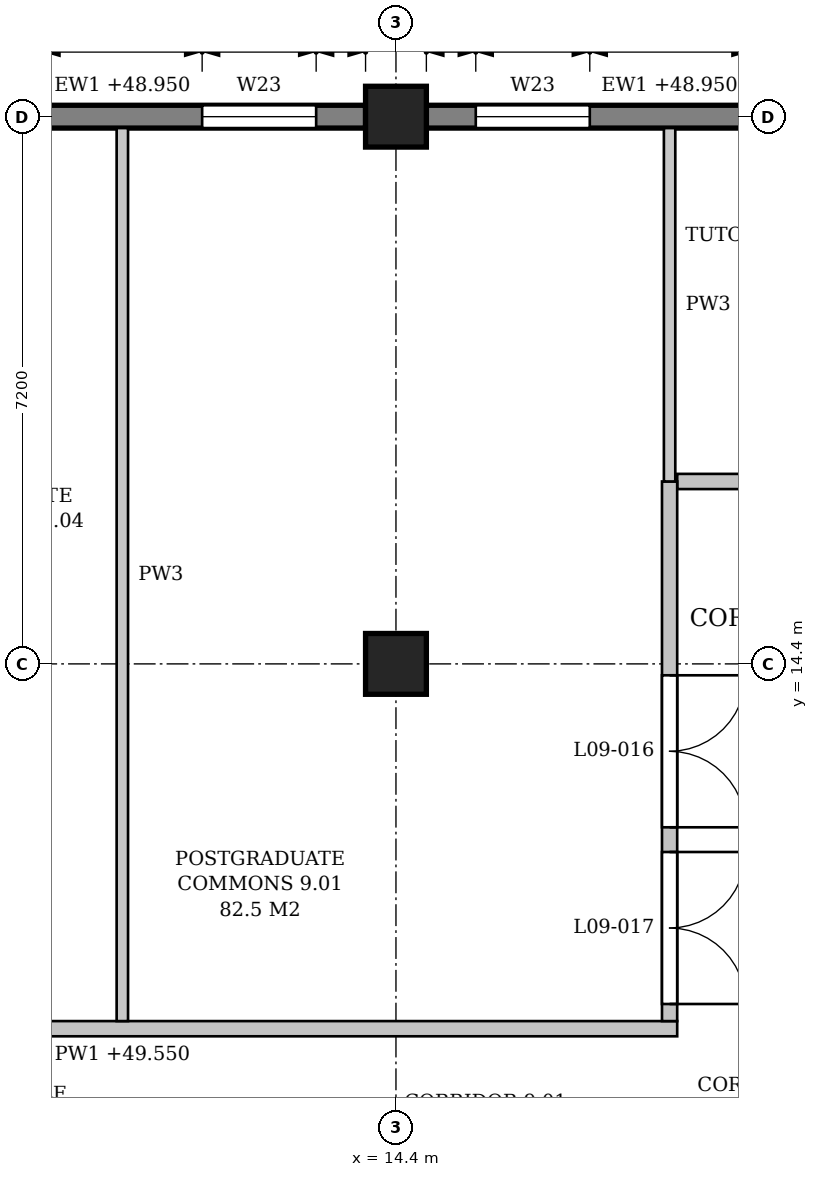
"""IFC4 building model, lengths in metres.
Left out: names, types, materials, properties, quantities, classifications, styles, units other than length and angle.
Written with IfcOpenShell. Run it as: python <this file> out.ifc"""

import sys

from ifc_helpers import new_model, si_unit, direction, frame, frame_2d, origin, origin_2d, place, context, subcontext, project, spatial, polyline, rectangle, outline, extrude, element, fill, save


model = new_model("IFC4")
c1 = context("Model", 3, precision=1e-05, world=origin(), true_north=direction((0.0, 1.0)))
c2 = subcontext(c1, "Body", "Model", "MODEL_VIEW")
j1 = project(units=[si_unit("LENGTHUNIT", "METRE"), si_unit("PLANEANGLEUNIT", "RADIAN")], contexts=[c1])
p1 = place(None, origin())
s1 = spatial("IfcSite", under=j1, at=p1, CompositionType="ELEMENT")
p2 = place(p1, origin())
s2 = spatial("IfcBuilding", under=s1, at=p2, CompositionType="ELEMENT")
p3 = place(p2, frame((0.0, 0.0, 45.3)))
s3 = spatial("IfcBuildingStorey", under=s2, at=p3, CompositionType="ELEMENT", Elevation=45.3)
for number, where, z_axis, x_axis in (
    (1, (14.4, 14.4, 0.0), (0.0, 0.0, 1.0), (1.0, 0.0, 0.0)),
    (2, (14.4, 21.6, 0.0), (0.0, 0.0, 1.0), (1.0, 0.0, 0.0)),
):
    element("IfcColumn", number, at=place(p3, frame(where, z_axis=z_axis, x_axis=x_axis)), inside=s3, PredefinedType="COLUMN", context=c2, shape_type="SweptSolid", body=[
        extrude(rectangle(XDim=0.8, YDim=0.8, at=origin_2d()), origin(), (0.0, 0.0, 1.0), 4.5),
    ])
p4 = place(p3, frame((21.2, 21.6, 0.0), z_axis=(0.0, 0.0, 1.0), x_axis=(-1.0, 0.0, 0.0)))
e3 = element("IfcWall", 3, at=p4, inside=s3, PredefinedType="STANDARD", context=c2, shape_type="SweptSolid", body=[
    extrude(rectangle(XDim=6.4, YDim=0.3, at=frame_2d((3.2, 0.0))), origin(), (0.0, 0.0, 1.0), 3.65),
])
p5 = place(p4, frame((0.65, 0.0, 0.9)))
e4 = element("IfcOpeningElement", 4, at=p5, cuts=e3, PredefinedType="OPENING", context=c2, shape_type="SweptSolid", body=[
    extrude(outline(polyline([(0.0, 0.0), (1.5, 0.0), (1.5, 1.95), (0.75, 2.7), (0.0, 1.95), (0.0, 0.0)])), frame((0.0, 0.16, 0.0), z_axis=(0.0, -1.0, 0.0), x_axis=(1.0, 0.0, 0.0)), (0.0, 0.0, 1.0), 0.32),
])
p6 = place(p4, frame((4.25, 0.0, 0.9)))
e5 = element("IfcOpeningElement", 5, at=p6, cuts=e3, PredefinedType="OPENING", context=c2, shape_type="SweptSolid", body=[
    extrude(outline(polyline([(0.0, 0.0), (1.5, 0.0), (1.5, 1.95), (0.75, 2.7), (0.0, 1.95), (0.0, 0.0)])), frame((0.0, 0.16, 0.0), z_axis=(0.0, -1.0, 0.0), x_axis=(1.0, 0.0, 0.0)), (0.0, 0.0, 1.0), 0.32),
])
p7 = place(p3, frame((14.0, 21.6, 0.0), z_axis=(0.0, 0.0, 1.0), x_axis=(-1.0, 0.0, 0.0)))
e6 = element("IfcWall", 6, at=p7, inside=s3, PredefinedType="STANDARD", context=c2, shape_type="SweptSolid", body=[
    extrude(rectangle(XDim=6.4, YDim=0.3, at=frame_2d((3.2, 0.0))), origin(), (0.0, 0.0, 1.0), 3.65),
])
p8 = place(p7, frame((0.65, 0.0, 0.9)))
e7 = element("IfcOpeningElement", 7, at=p8, cuts=e6, PredefinedType="OPENING", context=c2, shape_type="SweptSolid", body=[
    extrude(outline(polyline([(0.0, 0.0), (1.5, 0.0), (1.5, 1.95), (0.75, 2.7), (0.0, 1.95), (0.0, 0.0)])), frame((0.0, 0.16, 0.0), z_axis=(0.0, -1.0, 0.0), x_axis=(1.0, 0.0, 0.0)), (0.0, 0.0, 1.0), 0.32),
])
p9 = place(p7, frame((4.25, 0.0, 0.9)))
e8 = element("IfcOpeningElement", 8, at=p9, cuts=e6, PredefinedType="OPENING", context=c2, shape_type="SweptSolid", body=[
    extrude(outline(polyline([(0.0, 0.0), (1.5, 0.0), (1.5, 1.95), (0.75, 2.7), (0.0, 1.95), (0.0, 0.0)])), frame((0.0, 0.16, 0.0), z_axis=(0.0, -1.0, 0.0), x_axis=(1.0, 0.0, 0.0)), (0.0, 0.0, 1.0), 0.32),
])
p10 = place(p3, frame((3.5, 9.6, 0.0), z_axis=(0.0, 0.0, 1.0), x_axis=(1.0, 0.0, 0.0)))
e9 = element("IfcWall", 9, at=p10, inside=s3, PredefinedType="PARTITIONING", context=c2, shape_type="SweptSolid", body=[
    extrude(outline(polyline([(0.0, 0.0), (14.6, 0.0), (14.6, 4.25), (11.125, 4.25), (11.125, 3.55), (10.675, 3.55), (10.675, 4.25), (3.925, 4.25), (3.925, 3.55), (3.475, 3.55), (3.475, 4.25), (0.0, 4.25), (0.0, 0.0)])), frame((0.0, 0.1, 0.0), z_axis=(0.0, -1.0, 0.0), x_axis=(1.0, 0.0, 0.0)), (0.0, 0.0, 1.0), 0.2),
])
p11 = place(p10, frame((1.4, 0.0, 0.0)))
e10 = element("IfcOpeningElement", 10, at=p11, cuts=e9, PredefinedType="OPENING", context=c2, shape_type="SweptSolid", body=[
    extrude(rectangle(XDim=1.0, YDim=2.1, at=frame_2d((0.5, 1.05))), frame((0.0, 0.11, 0.0), z_axis=(0.0, -1.0, 0.0), x_axis=(1.0, 0.0, 0.0)), (0.0, 0.0, 1.0), 0.22),
])
p12 = place(p10, frame((5.0, 0.0, 0.0)))
e11 = element("IfcOpeningElement", 11, at=p12, cuts=e9, PredefinedType="OPENING", context=c2, shape_type="SweptSolid", body=[
    extrude(rectangle(XDim=1.0, YDim=2.1, at=frame_2d((0.5, 1.05))), frame((0.0, 0.11, 0.0), z_axis=(0.0, -1.0, 0.0), x_axis=(1.0, 0.0, 0.0)), (0.0, 0.0, 1.0), 0.22),
])
p13 = place(p3, frame((18.1, 16.8, 0.0), z_axis=(0.0, 0.0, 1.0), x_axis=(1.0, 0.0, 0.0)))
e12 = element("IfcWall", 12, at=p13, inside=s3, PredefinedType="PARTITIONING", context=c2, shape_type="SweptSolid", body=[
    extrude(outline(polyline([(0.0, 0.0), (3.4, 0.0), (3.4, 3.55), (3.275, 3.55), (3.275, 4.25), (0.0, 4.25), (0.0, 0.0)])), frame((0.0, 0.1, 0.0), z_axis=(0.0, -1.0, 0.0), x_axis=(1.0, 0.0, 0.0)), (0.0, 0.0, 1.0), 0.2),
])
p14 = place(p13, frame((1.2, 0.0, 0.0)))
e13 = element("IfcOpeningElement", 13, at=p14, cuts=e12, PredefinedType="OPENING", context=c2, shape_type="SweptSolid", body=[
    extrude(rectangle(XDim=1.0, YDim=2.1, at=frame_2d((0.5, 1.05))), frame((0.0, 0.11, 0.0), z_axis=(0.0, -1.0, 0.0), x_axis=(1.0, 0.0, 0.0)), (0.0, 0.0, 1.0), 0.22),
])
p15 = place(p3, frame((10.8, 9.7, 0.0), z_axis=(0.0, 0.0, 1.0), x_axis=(0.0, 1.0, 0.0)))
e14 = element("IfcWall", 14, at=p15, inside=s3, PredefinedType="PARTITIONING", context=c2, shape_type="SweptSolid", body=[
    extrude(rectangle(XDim=11.75, YDim=0.15, at=frame_2d((5.875, 0.0))), origin(), (0.0, 0.0, 1.0), 3.55),
])
p16 = place(p3, frame((18.0, 9.7, 0.0), z_axis=(0.0, 0.0, 1.0), x_axis=(0.0, 1.0, 0.0)))
e15 = element("IfcWall", 15, at=p16, inside=s3, PredefinedType="PARTITIONING", context=c2, shape_type="SweptSolid", body=[
    extrude(outline(polyline([(0.0, 0.0), (7.1, 0.0), (7.1, 4.25), (4.925, 4.25), (4.925, 3.55), (4.475, 3.55), (4.475, 4.25), (0.0, 4.25), (0.0, 0.0)])), frame((0.0, 0.1, 0.0), z_axis=(0.0, -1.0, 0.0), x_axis=(1.0, 0.0, 0.0)), (0.0, 0.0, 1.0), 0.2),
])
p17 = place(p16, frame((2.55, 0.0, 0.0)))
e16 = element("IfcOpeningElement", 16, at=p17, cuts=e15, PredefinedType="OPENING", context=c2, shape_type="SweptSolid", body=[
    extrude(rectangle(XDim=2.0, YDim=2.1, at=frame_2d((1.0, 1.05))), frame((0.0, 0.11, 0.0), z_axis=(0.0, -1.0, 0.0), x_axis=(1.0, 0.0, 0.0)), (0.0, 0.0, 1.0), 0.22),
])
p18 = place(p16, frame((0.225, 0.0, 0.0)))
e17 = element("IfcOpeningElement", 17, at=p18, cuts=e15, PredefinedType="OPENING", context=c2, shape_type="SweptSolid", body=[
    extrude(rectangle(XDim=2.0, YDim=2.1, at=frame_2d((1.0, 1.05))), frame((0.0, 0.11, 0.0), z_axis=(0.0, -1.0, 0.0), x_axis=(1.0, 0.0, 0.0)), (0.0, 0.0, 1.0), 0.22),
])
p19 = place(p3, frame((18.0, 16.8, 0.0), z_axis=(0.0, 0.0, 1.0), x_axis=(0.0, 1.0, 0.0)))
e18 = element("IfcWall", 18, at=p19, inside=s3, PredefinedType="PARTITIONING", context=c2, shape_type="SweptSolid", body=[
    extrude(rectangle(XDim=4.65, YDim=0.15, at=frame_2d((2.325, 0.0))), origin(), (0.0, 0.0, 1.0), 3.55),
])
p20 = place(p6, origin())
e19 = element("IfcWindow", 19, at=p20, inside=s3, PartitioningType="SINGLE_PANEL", PredefinedType="WINDOW", context=c2, shape_type="SweptSolid", body=[
    extrude(outline(polyline([(0.0, 0.0), (1.5, 0.0), (1.5, 1.95), (0.75, 2.7), (0.0, 1.95), (0.0, 0.0)])), frame((0.0, 0.03, 0.0), z_axis=(0.0, -1.0, 0.0), x_axis=(1.0, 0.0, 0.0)), (0.0, 0.0, 1.0), 0.06),
])
fill(e5, e19)
p21 = place(p8, origin())
e20 = element("IfcWindow", 20, at=p21, inside=s3, PartitioningType="SINGLE_PANEL", PredefinedType="WINDOW", context=c2, shape_type="SweptSolid", body=[
    extrude(outline(polyline([(0.0, 0.0), (1.5, 0.0), (1.5, 1.95), (0.75, 2.7), (0.0, 1.95), (0.0, 0.0)])), frame((0.0, 0.03, 0.0), z_axis=(0.0, -1.0, 0.0), x_axis=(1.0, 0.0, 0.0)), (0.0, 0.0, 1.0), 0.06),
])
fill(e7, e20)
p22 = place(p17, origin())
e21 = element("IfcDoor", 21, at=p22, inside=s3, OperationType="DOUBLE_DOOR_SINGLE_SWING", PredefinedType="DOOR", context=c2, shape_type="SweptSolid", body=[
    extrude(rectangle(XDim=2.0, YDim=2.1, at=frame_2d((1.0, 1.05))), frame((0.0, 0.025, 0.0), z_axis=(0.0, -1.0, 0.0), x_axis=(1.0, 0.0, 0.0)), (0.0, 0.0, 1.0), 0.05),
])
fill(e16, e21)
p23 = place(p18, origin())
e22 = element("IfcDoor", 22, at=p23, inside=s3, OperationType="DOUBLE_DOOR_SINGLE_SWING", PredefinedType="DOOR", context=c2, shape_type="SweptSolid", body=[
    extrude(rectangle(XDim=2.0, YDim=2.1, at=frame_2d((1.0, 1.05))), frame((0.0, 0.025, 0.0), z_axis=(0.0, -1.0, 0.0), x_axis=(1.0, 0.0, 0.0)), (0.0, 0.0, 1.0), 0.05),
])
fill(e17, e22)
save(model, sys.argv[1])
